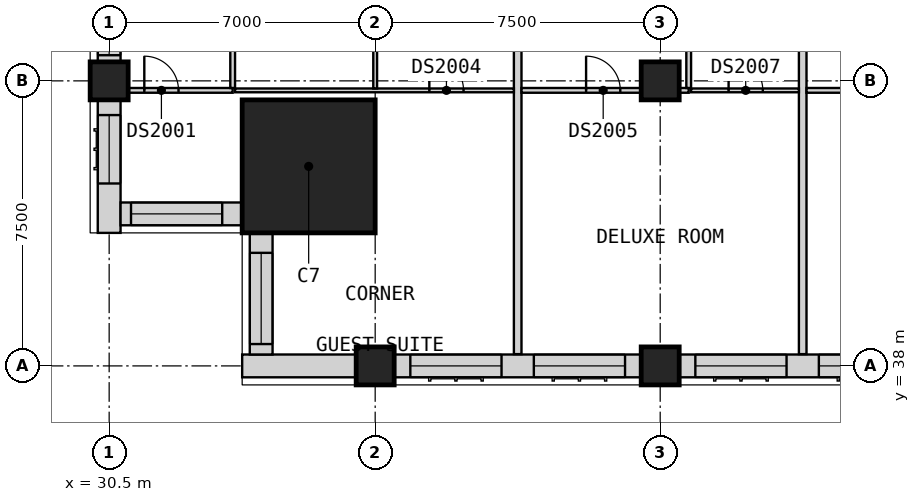
"""IFC4 building model, lengths in metres.
Left out: names, types, materials, properties, quantities, classifications, styles, units other than length and angle.
Written with IfcOpenShell. Run it as: python <this file> out.ifc"""

import sys

from ifc_helpers import new_model, si_unit, direction, frame, frame_2d, origin, origin_2d, place, context, subcontext, project, spatial, rectangle, extrude, element, fill, save


model = new_model("IFC4")
c1 = context("Model", 3, precision=1e-05, world=origin(), true_north=direction((0.0, 1.0)))
c2 = subcontext(c1, "Body", "Model", "MODEL_VIEW")
j1 = project(units=[si_unit("LENGTHUNIT", "METRE"), si_unit("PLANEANGLEUNIT", "RADIAN")], contexts=[c1])
p1 = place(None, origin())
s1 = spatial("IfcSite", under=j1, at=p1, CompositionType="ELEMENT")
p2 = place(p1, origin())
s2 = spatial("IfcBuilding", under=s1, at=p2, CompositionType="ELEMENT")
p3 = place(p2, frame((0.0, 0.0, 162.6)))
s3 = spatial("IfcBuildingStorey", under=s2, at=p3, CompositionType="ELEMENT", Elevation=162.6)
for number, where, z_axis, x_axis in (
    (1, (30.5, 45.5, 0.0), (0.0, 0.0, 1.0), (1.0, 0.0, 0.0)),
    (2, (37.5, 38.0, 0.0), (0.0, 0.0, 1.0), (1.0, 0.0, 0.0)),
    (3, (45.0, 38.0, 0.0), (0.0, 0.0, 1.0), (1.0, 0.0, 0.0)),
    (4, (45.0, 45.5, 0.0), (0.0, 0.0, 1.0), (1.0, 0.0, 0.0)),
):
    element("IfcColumn", number, at=place(p3, frame(where, z_axis=z_axis, x_axis=x_axis)), inside=s3, PredefinedType="COLUMN", context=c2, shape_type="SweptSolid", body=[
        extrude(rectangle(XDim=1.0, YDim=1.0, at=origin_2d()), origin(), (0.0, 0.0, 1.0), 3.6),
    ])
p4 = place(p3, frame((35.75, 43.25, 0.0), z_axis=(0.0, 0.0, 1.0), x_axis=(1.0, 0.0, 0.0)))
e5 = element("IfcColumn", 5, at=p4, inside=s3, PredefinedType="COLUMN", context=c2, shape_type="SweptSolid", body=[
    extrude(rectangle(XDim=3.5, YDim=3.5, at=origin_2d()), origin(), (0.0, 0.0, 1.0), 3.6),
])
p5 = place(p3, frame((34.0, 38.0, 0.0), z_axis=(0.0, 0.0, 1.0), x_axis=(1.0, 0.0, 0.0)))
e6 = element("IfcWall", 6, at=p5, inside=s3, PredefinedType="SOLIDWALL", context=c2, shape_type="SweptSolid", body=[
    extrude(rectangle(XDim=3.0, YDim=0.6, at=frame_2d((1.5, 0.0))), origin(), (0.0, 0.0, 1.0), 3.2),
])
p6 = place(p3, frame((38.0, 38.0, 0.0), z_axis=(0.0, 0.0, 1.0), x_axis=(1.0, 0.0, 0.0)))
e7 = element("IfcWall", 7, at=p6, inside=s3, PredefinedType="SOLIDWALL", context=c2, shape_type="SweptSolid", body=[
    extrude(rectangle(XDim=6.5, YDim=0.6, at=frame_2d((3.25, 0.0))), origin(), (0.0, 0.0, 1.0), 2.85),
])
p7 = place(p6, frame((0.425, 0.0, 0.8)))
e8 = element("IfcOpeningElement", 8, at=p7, cuts=e7, PredefinedType="OPENING", context=c2, shape_type="SweptSolid", body=[
    extrude(rectangle(XDim=2.4, YDim=1.8, at=frame_2d((1.2, 0.9))), frame((0.0, 0.31, 0.0), z_axis=(0.0, -1.0, 0.0), x_axis=(1.0, 0.0, 0.0)), (0.0, 0.0, 1.0), 0.62),
])
p8 = place(p6, frame((3.675, 0.0, 0.8)))
e9 = element("IfcOpeningElement", 9, at=p8, cuts=e7, PredefinedType="OPENING", context=c2, shape_type="SweptSolid", body=[
    extrude(rectangle(XDim=2.4, YDim=1.8, at=frame_2d((1.2, 0.9))), frame((0.0, 0.31, 0.0), z_axis=(0.0, -1.0, 0.0), x_axis=(1.0, 0.0, 0.0)), (0.0, 0.0, 1.0), 0.62),
])
p9 = place(p3, frame((45.5, 38.0, 0.0), z_axis=(0.0, 0.0, 1.0), x_axis=(1.0, 0.0, 0.0)))
e10 = element("IfcWall", 10, at=p9, inside=s3, PredefinedType="SOLIDWALL", context=c2, shape_type="SweptSolid", body=[
    extrude(rectangle(XDim=6.5, YDim=0.6, at=frame_2d((3.25, 0.0))), origin(), (0.0, 0.0, 1.0), 2.85),
])
p10 = place(p9, frame((0.425, 0.0, 0.8)))
e11 = element("IfcOpeningElement", 11, at=p10, cuts=e10, PredefinedType="OPENING", context=c2, shape_type="SweptSolid", body=[
    extrude(rectangle(XDim=2.4, YDim=1.8, at=frame_2d((1.2, 0.9))), frame((0.0, 0.31, 0.0), z_axis=(0.0, -1.0, 0.0), x_axis=(1.0, 0.0, 0.0)), (0.0, 0.0, 1.0), 0.62),
])
p11 = place(p9, frame((3.675, 0.0, 0.8)))
e12 = element("IfcOpeningElement", 12, at=p11, cuts=e10, PredefinedType="OPENING", context=c2, shape_type="SweptSolid", body=[
    extrude(rectangle(XDim=2.4, YDim=1.8, at=frame_2d((1.2, 0.9))), frame((0.0, 0.31, 0.0), z_axis=(0.0, -1.0, 0.0), x_axis=(1.0, 0.0, 0.0)), (0.0, 0.0, 1.0), 0.62),
])
p12 = place(p3, frame((30.5, 52.0, 0.0), z_axis=(0.0, 0.0, 1.0), x_axis=(0.0, -1.0, 0.0)))
e13 = element("IfcWall", 13, at=p12, inside=s3, PredefinedType="SOLIDWALL", context=c2, shape_type="SweptSolid", body=[
    extrude(rectangle(XDim=6.0, YDim=0.6, at=frame_2d((3.0, 0.0))), origin(), (0.0, 0.0, 1.0), 2.85),
])
p13 = place(p12, frame((3.425, 0.0, 0.8)))
e14 = element("IfcOpeningElement", 14, at=p13, cuts=e13, PredefinedType="OPENING", context=c2, shape_type="SweptSolid", body=[
    extrude(rectangle(XDim=2.4, YDim=1.8, at=frame_2d((1.2, 0.9))), frame((0.0, 0.31, 0.0), z_axis=(0.0, -1.0, 0.0), x_axis=(1.0, 0.0, 0.0)), (0.0, 0.0, 1.0), 0.62),
])
p14 = place(p12, frame((0.425, 0.0, 0.8)))
e15 = element("IfcOpeningElement", 15, at=p14, cuts=e13, PredefinedType="OPENING", context=c2, shape_type="SweptSolid", body=[
    extrude(rectangle(XDim=2.4, YDim=1.8, at=frame_2d((1.2, 0.9))), frame((0.0, 0.31, 0.0), z_axis=(0.0, -1.0, 0.0), x_axis=(1.0, 0.0, 0.0)), (0.0, 0.0, 1.0), 0.62),
])
p15 = place(p3, frame((30.5, 45.0, 0.0), z_axis=(0.0, 0.0, 1.0), x_axis=(0.0, -1.0, 0.0)))
e16 = element("IfcWall", 16, at=p15, inside=s3, PredefinedType="SOLIDWALL", context=c2, shape_type="SweptSolid", body=[
    extrude(rectangle(XDim=3.5, YDim=0.6, at=frame_2d((1.75, 0.0))), origin(), (0.0, 0.0, 1.0), 3.2),
])
p16 = place(p15, frame((0.4, 0.0, 0.8)))
e17 = element("IfcOpeningElement", 17, at=p16, cuts=e16, PredefinedType="OPENING", context=c2, shape_type="SweptSolid", body=[
    extrude(rectangle(XDim=1.8, YDim=1.8, at=frame_2d((0.9, 0.9))), frame((0.0, 0.31, 0.0), z_axis=(0.0, -1.0, 0.0), x_axis=(1.0, 0.0, 0.0)), (0.0, 0.0, 1.0), 0.62),
])
p17 = place(p3, frame((30.8, 42.0, 0.0), z_axis=(0.0, 0.0, 1.0), x_axis=(1.0, 0.0, 0.0)))
e18 = element("IfcWall", 18, at=p17, inside=s3, PredefinedType="SOLIDWALL", context=c2, shape_type="SweptSolid", body=[
    extrude(rectangle(XDim=3.2, YDim=0.6, at=frame_2d((1.6, 0.0))), origin(), (0.0, 0.0, 1.0), 3.2),
])
p18 = place(p17, frame((0.275, 0.0, 0.8)))
e19 = element("IfcOpeningElement", 19, at=p18, cuts=e18, PredefinedType="OPENING", context=c2, shape_type="SweptSolid", body=[
    extrude(rectangle(XDim=2.4, YDim=1.8, at=frame_2d((1.2, 0.9))), frame((0.0, 0.31, 0.0), z_axis=(0.0, -1.0, 0.0), x_axis=(1.0, 0.0, 0.0)), (0.0, 0.0, 1.0), 0.62),
])
p19 = place(p3, frame((34.5, 41.5, 0.0), z_axis=(0.0, 0.0, 1.0), x_axis=(0.0, -1.0, 0.0)))
e20 = element("IfcWall", 20, at=p19, inside=s3, PredefinedType="SOLIDWALL", context=c2, shape_type="SweptSolid", body=[
    extrude(rectangle(XDim=3.2, YDim=0.6, at=frame_2d((1.6, 0.0))), origin(), (0.0, 0.0, 1.0), 3.2),
])
p20 = place(p19, frame((0.525, 0.0, 0.8)))
e21 = element("IfcOpeningElement", 21, at=p20, cuts=e20, PredefinedType="OPENING", context=c2, shape_type="SweptSolid", body=[
    extrude(rectangle(XDim=2.4, YDim=1.8, at=frame_2d((1.2, 0.9))), frame((0.0, 0.31, 0.0), z_axis=(0.0, -1.0, 0.0), x_axis=(1.0, 0.0, 0.0)), (0.0, 0.0, 1.0), 0.62),
])
for number, where, z_axis, x_axis in (
    (22, (41.25, 38.31, 0.0), (0.0, 0.0, 1.0), (0.0, 1.0, 0.0)),
    (23, (48.75, 38.31, 0.0), (0.0, 0.0, 1.0), (0.0, 1.0, 0.0)),
):
    element("IfcWall", number, at=place(p3, frame(where, z_axis=z_axis, x_axis=x_axis)), inside=s3, PredefinedType="PARTITIONING", context=c2, shape_type="SweptSolid", body=[
        extrude(rectangle(XDim=11.715, YDim=0.2, at=frame_2d((5.857, 0.0))), origin(), (0.0, 0.0, 1.0), 3.2),
    ])
p21 = place(p3, frame((33.812, 45.25, 0.0), z_axis=(0.0, 0.0, 1.0), x_axis=(1.0, 0.0, 0.0)))
e24 = element("IfcWall", 24, at=p21, inside=s3, PredefinedType="PARTITIONING", context=c2, shape_type="SweptSolid", body=[
    extrude(rectangle(XDim=7.337, YDim=0.1, at=frame_2d((3.669, 0.0))), origin(), (0.0, 0.0, 1.0), 3.2),
])
p22 = place(p21, frame((5.113, 0.0, 0.0)))
e25 = element("IfcOpeningElement", 25, at=p22, cuts=e24, PredefinedType="OPENING", context=c2, shape_type="SweptSolid", body=[
    extrude(rectangle(XDim=0.9, YDim=2.1, at=frame_2d((0.45, 1.05))), frame((0.0, 0.06, 0.0), z_axis=(0.0, -1.0, 0.0), x_axis=(1.0, 0.0, 0.0)), (0.0, 0.0, 1.0), 0.12),
])
p23 = place(p3, frame((45.812, 45.25, 0.0), z_axis=(0.0, 0.0, 1.0), x_axis=(1.0, 0.0, 0.0)))
e26 = element("IfcWall", 26, at=p23, inside=s3, PredefinedType="PARTITIONING", context=c2, shape_type="SweptSolid", body=[
    extrude(rectangle(XDim=2.837, YDim=0.1, at=frame_2d((1.419, 0.0))), origin(), (0.0, 0.0, 1.0), 3.2),
])
p24 = place(p23, frame((0.988, 0.0, 0.0)))
e27 = element("IfcOpeningElement", 27, at=p24, cuts=e26, PredefinedType="OPENING", context=c2, shape_type="SweptSolid", body=[
    extrude(rectangle(XDim=0.9, YDim=2.1, at=frame_2d((0.45, 1.05))), frame((0.0, 0.06, 0.0), z_axis=(0.0, -1.0, 0.0), x_axis=(1.0, 0.0, 0.0)), (0.0, 0.0, 1.0), 0.12),
])
p25 = place(p3, frame((37.5, 45.3, 0.0), z_axis=(0.0, 0.0, 1.0), x_axis=(0.0, 1.0, 0.0)))
e28 = element("IfcWall", 28, at=p25, inside=s3, PredefinedType="PARTITIONING", context=c2, shape_type="SweptSolid", body=[
    extrude(rectangle(XDim=4.725, YDim=0.1, at=frame_2d((2.362, 0.0))), origin(), (0.0, 0.0, 1.0), 3.2),
])
p26 = place(p25, frame((1.925, 0.0, 0.0)))
e29 = element("IfcOpeningElement", 29, at=p26, cuts=e28, PredefinedType="OPENING", context=c2, shape_type="SweptSolid", body=[
    extrude(rectangle(XDim=0.9, YDim=2.1, at=frame_2d((0.45, 1.05))), frame((0.0, 0.06, 0.0), z_axis=(0.0, -1.0, 0.0), x_axis=(1.0, 0.0, 0.0)), (0.0, 0.0, 1.0), 0.12),
])
p27 = place(p3, frame((30.0, 45.25, 0.0), z_axis=(0.0, 0.0, 1.0), x_axis=(1.0, 0.0, 0.0)))
e30 = element("IfcWall", 30, at=p27, inside=s3, PredefinedType="PARTITIONING", context=c2, shape_type="SweptSolid", body=[
    extrude(rectangle(XDim=3.75, YDim=0.125, at=frame_2d((1.875, 0.0))), origin(), (0.0, 0.0, 1.0), 2.85),
])
p28 = place(p27, frame((1.425, 0.0, 0.0)))
e31 = element("IfcOpeningElement", 31, at=p28, cuts=e30, PredefinedType="OPENING", context=c2, shape_type="SweptSolid", body=[
    extrude(rectangle(XDim=0.9, YDim=2.1, at=frame_2d((0.45, 1.05))), frame((0.0, 0.073, 0.0), z_axis=(0.0, -1.0, 0.0), x_axis=(1.0, 0.0, 0.0)), (0.0, 0.0, 1.0), 0.145),
])
p29 = place(p3, frame((41.35, 45.25, 0.0), z_axis=(0.0, 0.0, 1.0), x_axis=(1.0, 0.0, 0.0)))
e32 = element("IfcWall", 32, at=p29, inside=s3, PredefinedType="PARTITIONING", context=c2, shape_type="SweptSolid", body=[
    extrude(rectangle(XDim=4.4, YDim=0.125, at=frame_2d((2.2, 0.0))), origin(), (0.0, 0.0, 1.0), 3.2),
])
p30 = place(p29, frame((1.7, 0.0, 0.0)))
e33 = element("IfcOpeningElement", 33, at=p30, cuts=e32, PredefinedType="OPENING", context=c2, shape_type="SweptSolid", body=[
    extrude(rectangle(XDim=0.9, YDim=2.1, at=frame_2d((0.45, 1.05))), frame((0.0, 0.073, 0.0), z_axis=(0.0, -1.0, 0.0), x_axis=(1.0, 0.0, 0.0)), (0.0, 0.0, 1.0), 0.145),
])
p31 = place(p3, frame((48.85, 45.25, 0.0), z_axis=(0.0, 0.0, 1.0), x_axis=(1.0, 0.0, 0.0)))
e34 = element("IfcWall", 34, at=p31, inside=s3, PredefinedType="PARTITIONING", context=c2, shape_type="SweptSolid", body=[
    extrude(rectangle(XDim=4.4, YDim=0.125, at=frame_2d((2.2, 0.0))), origin(), (0.0, 0.0, 1.0), 3.2),
])
p32 = place(p31, frame((1.7, 0.0, 0.0)))
e35 = element("IfcOpeningElement", 35, at=p32, cuts=e34, PredefinedType="OPENING", context=c2, shape_type="SweptSolid", body=[
    extrude(rectangle(XDim=0.9, YDim=2.1, at=frame_2d((0.45, 1.05))), frame((0.0, 0.073, 0.0), z_axis=(0.0, -1.0, 0.0), x_axis=(1.0, 0.0, 0.0)), (0.0, 0.0, 1.0), 0.145),
])
for number, where, z_axis, x_axis in (
    (36, (33.75, 45.312, 0.0), (0.0, 0.0, 1.0), (0.0, 1.0, 0.0)),
    (37, (45.75, 45.312, 0.0), (0.0, 0.0, 1.0), (0.0, 1.0, 0.0)),
):
    element("IfcWall", number, at=place(p3, frame(where, z_axis=z_axis, x_axis=x_axis)), inside=s3, PredefinedType="PARTITIONING", context=c2, shape_type="SweptSolid", body=[
        extrude(rectangle(XDim=4.712, YDim=0.125, at=frame_2d((2.356, 0.0))), origin(), (0.0, 0.0, 1.0), 3.2),
    ])
p33 = place(p7, origin())
e38 = element("IfcWindow", 38, at=p33, inside=s3, PartitioningType="SINGLE_PANEL", PredefinedType="WINDOW", context=c2, shape_type="SweptSolid", body=[
    extrude(rectangle(XDim=2.4, YDim=1.8, at=frame_2d((1.2, 0.9))), frame((0.0, -0.07, 0.0), z_axis=(0.0, -1.0, 0.0), x_axis=(1.0, 0.0, 0.0)), (0.0, 0.0, 1.0), 0.06),
])
fill(e8, e38)
p34 = place(p8, origin())
e39 = element("IfcWindow", 39, at=p34, inside=s3, PartitioningType="SINGLE_PANEL", PredefinedType="WINDOW", context=c2, shape_type="SweptSolid", body=[
    extrude(rectangle(XDim=2.4, YDim=1.8, at=frame_2d((1.2, 0.9))), frame((0.0, -0.07, 0.0), z_axis=(0.0, -1.0, 0.0), x_axis=(1.0, 0.0, 0.0)), (0.0, 0.0, 1.0), 0.06),
])
fill(e9, e39)
p35 = place(p10, origin())
e40 = element("IfcWindow", 40, at=p35, inside=s3, PartitioningType="SINGLE_PANEL", PredefinedType="WINDOW", context=c2, shape_type="SweptSolid", body=[
    extrude(rectangle(XDim=2.4, YDim=1.8, at=frame_2d((1.2, 0.9))), frame((0.0, -0.07, 0.0), z_axis=(0.0, -1.0, 0.0), x_axis=(1.0, 0.0, 0.0)), (0.0, 0.0, 1.0), 0.06),
])
fill(e11, e40)
p36 = place(p11, origin())
e41 = element("IfcWindow", 41, at=p36, inside=s3, PartitioningType="SINGLE_PANEL", PredefinedType="WINDOW", context=c2, shape_type="SweptSolid", body=[
    extrude(rectangle(XDim=2.4, YDim=1.8, at=frame_2d((1.2, 0.9))), frame((0.0, -0.07, 0.0), z_axis=(0.0, -1.0, 0.0), x_axis=(1.0, 0.0, 0.0)), (0.0, 0.0, 1.0), 0.06),
])
fill(e12, e41)
p37 = place(p13, origin())
e42 = element("IfcWindow", 42, at=p37, inside=s3, PartitioningType="SINGLE_PANEL", PredefinedType="WINDOW", context=c2, shape_type="SweptSolid", body=[
    extrude(rectangle(XDim=2.4, YDim=1.8, at=frame_2d((1.2, 0.9))), frame((0.0, -0.07, 0.0), z_axis=(0.0, -1.0, 0.0), x_axis=(1.0, 0.0, 0.0)), (0.0, 0.0, 1.0), 0.06),
])
fill(e14, e42)
p38 = place(p16, origin())
e43 = element("IfcWindow", 43, at=p38, inside=s3, PartitioningType="SINGLE_PANEL", PredefinedType="WINDOW", context=c2, shape_type="SweptSolid", body=[
    extrude(rectangle(XDim=1.8, YDim=1.8, at=frame_2d((0.9, 0.9))), frame((0.0, -0.07, 0.0), z_axis=(0.0, -1.0, 0.0), x_axis=(1.0, 0.0, 0.0)), (0.0, 0.0, 1.0), 0.06),
])
fill(e17, e43)
p39 = place(p18, origin())
e44 = element("IfcWindow", 44, at=p39, inside=s3, PartitioningType="SINGLE_PANEL", PredefinedType="WINDOW", context=c2, shape_type="SweptSolid", body=[
    extrude(rectangle(XDim=2.4, YDim=1.8, at=frame_2d((1.2, 0.9))), frame((0.0, -0.07, 0.0), z_axis=(0.0, -1.0, 0.0), x_axis=(1.0, 0.0, 0.0)), (0.0, 0.0, 1.0), 0.06),
])
fill(e19, e44)
p40 = place(p20, origin())
e45 = element("IfcWindow", 45, at=p40, inside=s3, PartitioningType="SINGLE_PANEL", PredefinedType="WINDOW", context=c2, shape_type="SweptSolid", body=[
    extrude(rectangle(XDim=2.4, YDim=1.8, at=frame_2d((1.2, 0.9))), frame((0.0, -0.07, 0.0), z_axis=(0.0, -1.0, 0.0), x_axis=(1.0, 0.0, 0.0)), (0.0, 0.0, 1.0), 0.06),
])
fill(e21, e45)
p41 = place(p28, origin())
e46 = element("IfcDoor", 46, at=p41, inside=s3, OperationType="SINGLE_SWING_LEFT", PredefinedType="DOOR", context=c2, shape_type="SweptSolid", body=[
    extrude(rectangle(XDim=0.9, YDim=2.1, at=frame_2d((0.45, 1.05))), frame((0.0, 0.025, 0.0), z_axis=(0.0, -1.0, 0.0), x_axis=(1.0, 0.0, 0.0)), (0.0, 0.0, 1.0), 0.05),
])
fill(e31, e46)
p42 = place(p22, origin())
e47 = element("IfcDoor", 47, at=p42, inside=s3, OperationType="SINGLE_SWING_LEFT", PredefinedType="DOOR", context=c2, shape_type="SweptSolid", body=[
    extrude(rectangle(XDim=0.9, YDim=2.1, at=frame_2d((0.45, 1.05))), frame((0.0, 0.025, 0.0), z_axis=(0.0, -1.0, 0.0), x_axis=(1.0, 0.0, 0.0)), (0.0, 0.0, 1.0), 0.05),
])
fill(e25, e47)
p43 = place(p30, origin())
e48 = element("IfcDoor", 48, at=p43, inside=s3, OperationType="SINGLE_SWING_LEFT", PredefinedType="DOOR", context=c2, shape_type="SweptSolid", body=[
    extrude(rectangle(XDim=0.9, YDim=2.1, at=frame_2d((0.45, 1.05))), frame((0.0, 0.025, 0.0), z_axis=(0.0, -1.0, 0.0), x_axis=(1.0, 0.0, 0.0)), (0.0, 0.0, 1.0), 0.05),
])
fill(e33, e48)
p44 = place(p24, origin())
e49 = element("IfcDoor", 49, at=p44, inside=s3, OperationType="SINGLE_SWING_LEFT", PredefinedType="DOOR", context=c2, shape_type="SweptSolid", body=[
    extrude(rectangle(XDim=0.9, YDim=2.1, at=frame_2d((0.45, 1.05))), frame((0.0, 0.025, 0.0), z_axis=(0.0, -1.0, 0.0), x_axis=(1.0, 0.0, 0.0)), (0.0, 0.0, 1.0), 0.05),
])
fill(e27, e49)
save(model, sys.argv[1])
